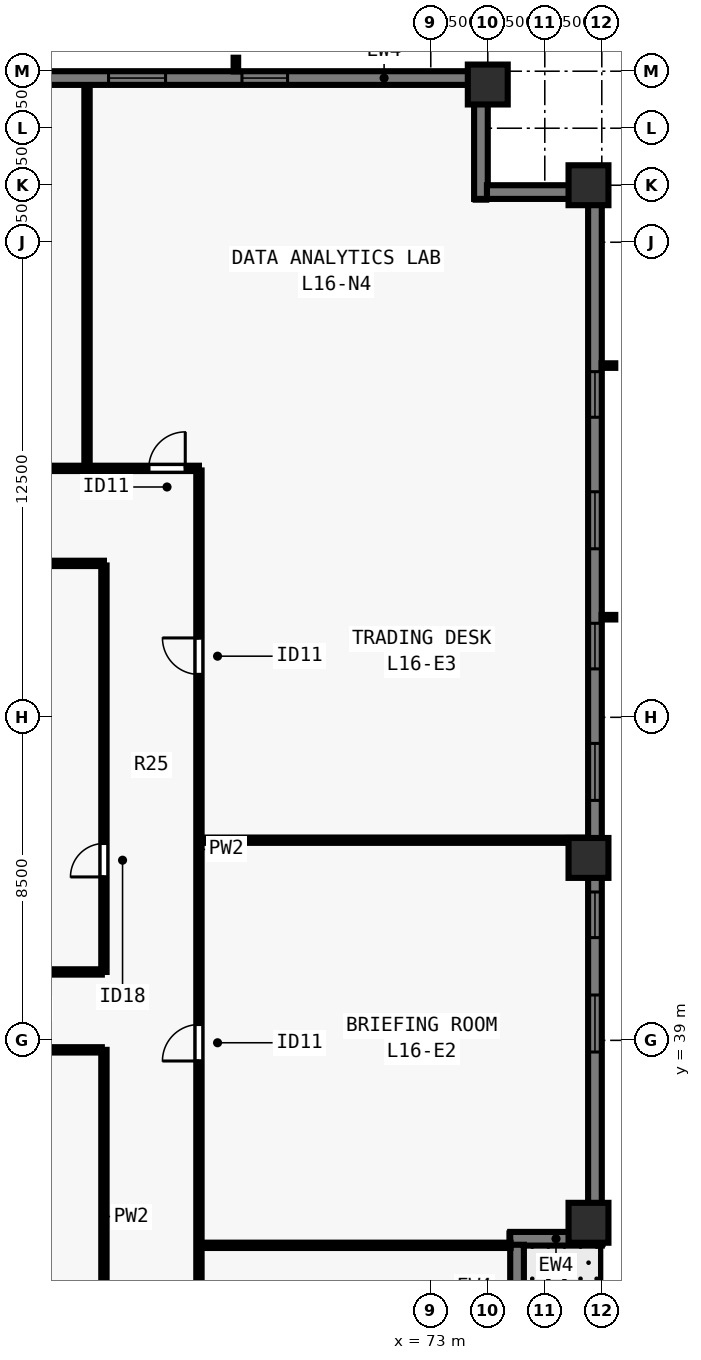
"""IFC4 building model, lengths in metres.
Left out: names, types, materials, properties, quantities, classifications, styles, units other than length and angle.
Written with IfcOpenShell. Run it as: python <this file> out.ifc"""

import sys

from ifc_helpers import new_model, si_unit, direction, frame, frame_2d, origin, origin_2d, place, context, subcontext, project, spatial, rectangle, extrude, element, fill, save


model = new_model("IFC4")
c1 = context("Model", 3, precision=1e-05, world=origin(), true_north=direction((0.0, 1.0)))
c2 = subcontext(c1, "Body", "Model", "MODEL_VIEW")
j1 = project(units=[si_unit("LENGTHUNIT", "METRE"), si_unit("PLANEANGLEUNIT", "RADIAN")], contexts=[c1])
p1 = place(None, origin())
s1 = spatial("IfcSite", under=j1, at=p1, CompositionType="ELEMENT")
p2 = place(p1, origin())
s2 = spatial("IfcBuilding", under=s1, at=p2, CompositionType="ELEMENT")
p3 = place(p2, frame((0.0, 0.0, 62.0)))
s3 = spatial("IfcBuildingStorey", under=s2, at=p3, CompositionType="ELEMENT", Elevation=62.0)
for number, where, z_axis, x_axis in (
    (1, (77.15, 34.2, 0.0), (0.0, 0.0, 1.0), (0.0, 1.0, 0.0)),
    (2, (77.15, 43.8, 0.0), (0.0, 0.0, 1.0), (0.0, 1.0, 0.0)),
    (3, (77.15, 61.5, 0.0), (0.0, 0.0, 1.0), (0.0, 1.0, 0.0)),
    (4, (74.5, 64.15, 0.0), (0.0, 0.0, 1.0), (1.0, 0.0, 0.0)),
):
    element("IfcColumn", number, at=place(p3, frame(where, z_axis=z_axis, x_axis=x_axis)), inside=s3, PredefinedType="COLUMN", context=c2, shape_type="SweptSolid", body=[
        extrude(rectangle(XDim=1.05, YDim=1.05, at=origin_2d()), origin(), (0.0, 0.0, 1.0), 3.5),
    ])
p4 = place(p3, frame((29.5, 64.32, 0.0), z_axis=(0.0, 0.0, 1.0), x_axis=(1.0, 0.0, 0.0)))
e5 = element("IfcWall", 5, at=p4, inside=s3, PredefinedType="SOLIDWALL", context=c2, shape_type="SweptSolid", body=[
    extrude(rectangle(XDim=44.662, YDim=0.36, at=frame_2d((22.331, 0.0))), origin(), (0.0, 0.0, 1.0), 3.28),
])
p5 = place(p4, frame((4.93, 0.0, 0.8)))
e6 = element("IfcOpeningElement", 6, at=p5, cuts=e5, PredefinedType="OPENING", context=c2, shape_type="SweptSolid", body=[
    extrude(rectangle(XDim=1.2, YDim=1.544, at=frame_2d((0.6, 0.772))), frame((0.0, 0.19, 0.0), z_axis=(0.0, -1.0, 0.0), x_axis=(1.0, 0.0, 0.0)), (0.0, 0.0, 1.0), 0.38),
])
p6 = place(p4, frame((7.29, 0.0, 0.8)))
e7 = element("IfcOpeningElement", 7, at=p6, cuts=e5, PredefinedType="OPENING", context=c2, shape_type="SweptSolid", body=[
    extrude(rectangle(XDim=1.5, YDim=1.544, at=frame_2d((0.75, 0.772))), frame((0.0, 0.19, 0.0), z_axis=(0.0, -1.0, 0.0), x_axis=(1.0, 0.0, 0.0)), (0.0, 0.0, 1.0), 0.38),
])
p7 = place(p4, frame((11.65, 0.0, 0.8)))
e8 = element("IfcOpeningElement", 8, at=p7, cuts=e5, PredefinedType="OPENING", context=c2, shape_type="SweptSolid", body=[
    extrude(rectangle(XDim=1.2, YDim=1.544, at=frame_2d((0.6, 0.772))), frame((0.0, 0.19, 0.0), z_axis=(0.0, -1.0, 0.0), x_axis=(1.0, 0.0, 0.0)), (0.0, 0.0, 1.0), 0.38),
])
p8 = place(p4, frame((14.861, 0.0, 0.8)))
e9 = element("IfcOpeningElement", 9, at=p8, cuts=e5, PredefinedType="OPENING", context=c2, shape_type="SweptSolid", body=[
    extrude(rectangle(XDim=1.5, YDim=1.544, at=frame_2d((0.75, 0.772))), frame((0.0, 0.19, 0.0), z_axis=(0.0, -1.0, 0.0), x_axis=(1.0, 0.0, 0.0)), (0.0, 0.0, 1.0), 0.38),
])
p9 = place(p4, frame((18.821, 0.0, 0.8)))
e10 = element("IfcOpeningElement", 10, at=p9, cuts=e5, PredefinedType="OPENING", context=c2, shape_type="SweptSolid", body=[
    extrude(rectangle(XDim=1.2, YDim=1.544, at=frame_2d((0.6, 0.772))), frame((0.0, 0.19, 0.0), z_axis=(0.0, -1.0, 0.0), x_axis=(1.0, 0.0, 0.0)), (0.0, 0.0, 1.0), 0.38),
])
p10 = place(p4, frame((20.731, 0.0, 0.8)))
e11 = element("IfcOpeningElement", 11, at=p10, cuts=e5, PredefinedType="OPENING", context=c2, shape_type="SweptSolid", body=[
    extrude(rectangle(XDim=1.5, YDim=1.544, at=frame_2d((0.75, 0.772))), frame((0.0, 0.19, 0.0), z_axis=(0.0, -1.0, 0.0), x_axis=(1.0, 0.0, 0.0)), (0.0, 0.0, 1.0), 0.38),
])
p11 = place(p4, frame((25.091, 0.0, 0.8)))
e12 = element("IfcOpeningElement", 12, at=p11, cuts=e5, PredefinedType="OPENING", context=c2, shape_type="SweptSolid", body=[
    extrude(rectangle(XDim=1.2, YDim=1.544, at=frame_2d((0.6, 0.772))), frame((0.0, 0.19, 0.0), z_axis=(0.0, -1.0, 0.0), x_axis=(1.0, 0.0, 0.0)), (0.0, 0.0, 1.0), 0.38),
])
p12 = place(p4, frame((28.302, 0.0, 0.8)))
e13 = element("IfcOpeningElement", 13, at=p12, cuts=e5, PredefinedType="OPENING", context=c2, shape_type="SweptSolid", body=[
    extrude(rectangle(XDim=1.5, YDim=1.544, at=frame_2d((0.75, 0.772))), frame((0.0, 0.19, 0.0), z_axis=(0.0, -1.0, 0.0), x_axis=(1.0, 0.0, 0.0)), (0.0, 0.0, 1.0), 0.38),
])
p13 = place(p4, frame((31.812, 0.0, 0.8)))
e14 = element("IfcOpeningElement", 14, at=p13, cuts=e5, PredefinedType="OPENING", context=c2, shape_type="SweptSolid", body=[
    extrude(rectangle(XDim=1.2, YDim=1.544, at=frame_2d((0.6, 0.772))), frame((0.0, 0.19, 0.0), z_axis=(0.0, -1.0, 0.0), x_axis=(1.0, 0.0, 0.0)), (0.0, 0.0, 1.0), 0.38),
])
p14 = place(p4, frame((35.022, 0.0, 0.8)))
e15 = element("IfcOpeningElement", 15, at=p14, cuts=e5, PredefinedType="OPENING", context=c2, shape_type="SweptSolid", body=[
    extrude(rectangle(XDim=1.5, YDim=1.544, at=frame_2d((0.75, 0.772))), frame((0.0, 0.19, 0.0), z_axis=(0.0, -1.0, 0.0), x_axis=(1.0, 0.0, 0.0)), (0.0, 0.0, 1.0), 0.38),
])
p15 = place(p4, frame((38.532, 0.0, 0.8)))
e16 = element("IfcOpeningElement", 16, at=p15, cuts=e5, PredefinedType="OPENING", context=c2, shape_type="SweptSolid", body=[
    extrude(rectangle(XDim=1.2, YDim=1.544, at=frame_2d((0.6, 0.772))), frame((0.0, 0.19, 0.0), z_axis=(0.0, -1.0, 0.0), x_axis=(1.0, 0.0, 0.0)), (0.0, 0.0, 1.0), 0.38),
])
p16 = place(p3, frame((74.32, 64.5, 0.0), z_axis=(0.0, 0.0, 1.0), x_axis=(0.0, -1.0, 0.0)))
e17 = element("IfcWall", 17, at=p16, inside=s3, PredefinedType="SOLIDWALL", context=c2, shape_type="SweptSolid", body=[
    extrude(rectangle(XDim=3.36, YDim=0.36, at=frame_2d((1.68, 0.0))), origin(), (0.0, 0.0, 1.0), 3.28),
])
p17 = place(p3, frame((74.478, 61.32, 0.0), z_axis=(0.0, 0.0, 1.0), x_axis=(1.0, 0.0, 0.0)))
e18 = element("IfcWall", 18, at=p17, inside=s3, PredefinedType="SOLIDWALL", context=c2, shape_type="SweptSolid", body=[
    extrude(rectangle(XDim=2.684, YDim=0.36, at=frame_2d((1.342, 0.0))), origin(), (0.0, 0.0, 1.0), 3.28),
])
p18 = place(p3, frame((77.32, 61.5, 0.0), z_axis=(0.0, 0.0, 1.0), x_axis=(0.0, -1.0, 0.0)))
e19 = element("IfcWall", 19, at=p18, inside=s3, PredefinedType="SOLIDWALL", context=c2, shape_type="SweptSolid", body=[
    extrude(rectangle(XDim=27.562, YDim=0.36, at=frame_2d((13.781, 0.0))), origin(), (0.0, 0.0, 1.0), 3.28),
])
p19 = place(p18, frame((4.905, 0.0, 0.8)))
e20 = element("IfcOpeningElement", 20, at=p19, cuts=e19, PredefinedType="OPENING", context=c2, shape_type="SweptSolid", body=[
    extrude(rectangle(XDim=1.2, YDim=1.544, at=frame_2d((0.6, 0.772))), frame((0.0, 0.19, 0.0), z_axis=(0.0, -1.0, 0.0), x_axis=(1.0, 0.0, 0.0)), (0.0, 0.0, 1.0), 0.38),
])
p20 = place(p18, frame((8.065, 0.0, 0.8)))
e21 = element("IfcOpeningElement", 21, at=p20, cuts=e19, PredefinedType="OPENING", context=c2, shape_type="SweptSolid", body=[
    extrude(rectangle(XDim=1.5, YDim=1.544, at=frame_2d((0.75, 0.772))), frame((0.0, 0.19, 0.0), z_axis=(0.0, -1.0, 0.0), x_axis=(1.0, 0.0, 0.0)), (0.0, 0.0, 1.0), 0.38),
])
p21 = place(p18, frame((11.526, 0.0, 0.8)))
e22 = element("IfcOpeningElement", 22, at=p21, cuts=e19, PredefinedType="OPENING", context=c2, shape_type="SweptSolid", body=[
    extrude(rectangle(XDim=1.2, YDim=1.544, at=frame_2d((0.6, 0.772))), frame((0.0, 0.19, 0.0), z_axis=(0.0, -1.0, 0.0), x_axis=(1.0, 0.0, 0.0)), (0.0, 0.0, 1.0), 0.38),
])
p22 = place(p18, frame((14.686, 0.0, 0.8)))
e23 = element("IfcOpeningElement", 23, at=p22, cuts=e19, PredefinedType="OPENING", context=c2, shape_type="SweptSolid", body=[
    extrude(rectangle(XDim=1.5, YDim=1.544, at=frame_2d((0.75, 0.772))), frame((0.0, 0.19, 0.0), z_axis=(0.0, -1.0, 0.0), x_axis=(1.0, 0.0, 0.0)), (0.0, 0.0, 1.0), 0.38),
])
p23 = place(p18, frame((18.596, 0.0, 0.8)))
e24 = element("IfcOpeningElement", 24, at=p23, cuts=e19, PredefinedType="OPENING", context=c2, shape_type="SweptSolid", body=[
    extrude(rectangle(XDim=1.2, YDim=1.544, at=frame_2d((0.6, 0.772))), frame((0.0, 0.19, 0.0), z_axis=(0.0, -1.0, 0.0), x_axis=(1.0, 0.0, 0.0)), (0.0, 0.0, 1.0), 0.38),
])
p24 = place(p18, frame((21.307, 0.0, 0.8)))
e25 = element("IfcOpeningElement", 25, at=p24, cuts=e19, PredefinedType="OPENING", context=c2, shape_type="SweptSolid", body=[
    extrude(rectangle(XDim=1.5, YDim=1.544, at=frame_2d((0.75, 0.772))), frame((0.0, 0.19, 0.0), z_axis=(0.0, -1.0, 0.0), x_axis=(1.0, 0.0, 0.0)), (0.0, 0.0, 1.0), 0.38),
])
p25 = place(p3, frame((77.5, 33.78, 0.0), z_axis=(0.0, 0.0, 1.0), x_axis=(-1.0, 0.0, 0.0)))
e26 = element("IfcWall", 26, at=p25, inside=s3, PredefinedType="SOLIDWALL", context=c2, shape_type="SweptSolid", body=[
    extrude(rectangle(XDim=2.41, YDim=0.36, at=frame_2d((1.205, 0.0))), origin(), (0.0, 0.0, 1.0), 3.28),
])
p26 = place(p3, frame((75.27, 33.622, 0.0), z_axis=(0.0, 0.0, 1.0), x_axis=(0.0, -1.0, 0.0)))
e27 = element("IfcWall", 27, at=p26, inside=s3, PredefinedType="SOLIDWALL", context=c2, shape_type="SweptSolid", body=[
    extrude(rectangle(XDim=5.782, YDim=0.36, at=frame_2d((2.891, 0.0))), origin(), (0.0, 0.0, 1.0), 3.28),
])
p27 = place(p26, frame((2.391, 0.0, 0.0)))
e28 = element("IfcOpeningElement", 28, at=p27, cuts=e27, PredefinedType="OPENING", context=c2, shape_type="SweptSolid", body=[
    extrude(rectangle(XDim=1.0, YDim=2.15, at=frame_2d((0.5, 1.075))), frame((0.0, 0.19, 0.0), z_axis=(0.0, -1.0, 0.0), x_axis=(1.0, 0.0, 0.0)), (0.0, 0.0, 1.0), 0.38),
])
p28 = place(p3, frame((37.1, 54.05, 0.0), z_axis=(0.0, 0.0, 1.0), x_axis=(1.0, 0.0, 0.0)))
e29 = element("IfcWall", 29, at=p28, inside=s3, PredefinedType="PARTITIONING", context=c2, shape_type="SweptSolid", body=[
    extrude(rectangle(XDim=29.8, YDim=0.14, at=frame_2d((14.9, 0.0))), origin(), (0.0, 0.0, 1.0), 3.28),
])
p29 = place(p28, frame((3.522, 0.0, 0.0)))
e30 = element("IfcOpeningElement", 30, at=p29, cuts=e29, PredefinedType="OPENING", context=c2, shape_type="SweptSolid", body=[
    extrude(rectangle(XDim=0.96, YDim=2.12, at=frame_2d((0.48, 1.06))), frame((0.0, 0.08, 0.0), z_axis=(0.0, -1.0, 0.0), x_axis=(1.0, 0.0, 0.0)), (0.0, 0.0, 1.0), 0.16),
])
p30 = place(p28, frame((8.06, 0.0, 0.0)))
e31 = element("IfcOpeningElement", 31, at=p30, cuts=e29, PredefinedType="OPENING", context=c2, shape_type="SweptSolid", body=[
    extrude(rectangle(XDim=0.96, YDim=2.12, at=frame_2d((0.48, 1.06))), frame((0.0, 0.08, 0.0), z_axis=(0.0, -1.0, 0.0), x_axis=(1.0, 0.0, 0.0)), (0.0, 0.0, 1.0), 0.16),
])
p31 = place(p28, frame((20.6, 0.0, 0.0)))
e32 = element("IfcOpeningElement", 32, at=p31, cuts=e29, PredefinedType="OPENING", context=c2, shape_type="SweptSolid", body=[
    extrude(rectangle(XDim=0.96, YDim=2.12, at=frame_2d((0.48, 1.06))), frame((0.0, 0.08, 0.0), z_axis=(0.0, -1.0, 0.0), x_axis=(1.0, 0.0, 0.0)), (0.0, 0.0, 1.0), 0.16),
])
p32 = place(p28, frame((28.48, 0.0, 0.0)))
e33 = element("IfcOpeningElement", 33, at=p32, cuts=e29, PredefinedType="OPENING", context=c2, shape_type="SweptSolid", body=[
    extrude(rectangle(XDim=0.96, YDim=2.12, at=frame_2d((0.48, 1.06))), frame((0.0, 0.08, 0.0), z_axis=(0.0, -1.0, 0.0), x_axis=(1.0, 0.0, 0.0)), (0.0, 0.0, 1.0), 0.16),
])
p33 = place(p3, frame((66.9, 24.005, 0.0), z_axis=(0.0, 0.0, 1.0), x_axis=(0.0, 1.0, 0.0)))
e34 = element("IfcWall", 34, at=p33, inside=s3, PredefinedType="PARTITIONING", context=c2, shape_type="SweptSolid", body=[
    extrude(rectangle(XDim=29.99, YDim=0.14, at=frame_2d((14.995, 0.0))), origin(), (0.0, 0.0, 1.0), 3.28),
])
p34 = place(p33, frame((4.344, 0.0, 0.0)))
e35 = element("IfcOpeningElement", 35, at=p34, cuts=e34, PredefinedType="OPENING", context=c2, shape_type="SweptSolid", body=[
    extrude(rectangle(XDim=0.96, YDim=2.12, at=frame_2d((0.48, 1.06))), frame((0.0, 0.08, 0.0), z_axis=(0.0, -1.0, 0.0), x_axis=(1.0, 0.0, 0.0)), (0.0, 0.0, 1.0), 0.16),
])
p35 = place(p33, frame((14.452, 0.0, 0.0)))
e36 = element("IfcOpeningElement", 36, at=p35, cuts=e34, PredefinedType="OPENING", context=c2, shape_type="SweptSolid", body=[
    extrude(rectangle(XDim=0.96, YDim=2.12, at=frame_2d((0.48, 1.06))), frame((0.0, 0.08, 0.0), z_axis=(0.0, -1.0, 0.0), x_axis=(1.0, 0.0, 0.0)), (0.0, 0.0, 1.0), 0.16),
])
p36 = place(p33, frame((24.623, 0.0, 0.0)))
e37 = element("IfcOpeningElement", 37, at=p36, cuts=e34, PredefinedType="OPENING", context=c2, shape_type="SweptSolid", body=[
    extrude(rectangle(XDim=0.96, YDim=2.12, at=frame_2d((0.48, 1.06))), frame((0.0, 0.08, 0.0), z_axis=(0.0, -1.0, 0.0), x_axis=(1.0, 0.0, 0.0)), (0.0, 0.0, 1.0), 0.16),
])
p37 = place(p3, frame((39.6, 51.55, 0.0), z_axis=(0.0, 0.0, 1.0), x_axis=(1.0, 0.0, 0.0)))
e38 = element("IfcWall", 38, at=p37, inside=s3, PredefinedType="PARTITIONING", context=c2, shape_type="SweptSolid", body=[
    extrude(rectangle(XDim=24.8, YDim=0.14, at=frame_2d((12.4, 0.0))), origin(), (0.0, 0.0, 1.0), 3.28),
])
p38 = place(p37, frame((3.2, 0.0, 0.0)))
e39 = element("IfcOpeningElement", 39, at=p38, cuts=e38, PredefinedType="OPENING", context=c2, shape_type="SweptSolid", body=[
    extrude(rectangle(XDim=0.96, YDim=2.12, at=frame_2d((0.48, 1.06))), frame((0.0, 0.08, 0.0), z_axis=(0.0, -1.0, 0.0), x_axis=(1.0, 0.0, 0.0)), (0.0, 0.0, 1.0), 0.16),
])
p39 = place(p37, frame((18.4, 0.0, 0.0)))
e40 = element("IfcOpeningElement", 40, at=p39, cuts=e38, PredefinedType="OPENING", context=c2, shape_type="SweptSolid", body=[
    extrude(rectangle(XDim=0.96, YDim=2.12, at=frame_2d((0.48, 1.06))), frame((0.0, 0.08, 0.0), z_axis=(0.0, -1.0, 0.0), x_axis=(1.0, 0.0, 0.0)), (0.0, 0.0, 1.0), 0.16),
])
p40 = place(p3, frame((64.4, 26.505, 0.0), z_axis=(0.0, 0.0, 1.0), x_axis=(0.0, 1.0, 0.0)))
e41 = element("IfcWall", 41, at=p40, inside=s3, PredefinedType="PARTITIONING", context=c2, shape_type="SweptSolid", body=[
    extrude(rectangle(XDim=12.245, YDim=0.14, at=frame_2d((6.123, 0.0))), origin(), (0.0, 0.0, 1.0), 3.28),
])
p41 = place(p40, frame((2.445, 0.0, 0.0)))
e42 = element("IfcOpeningElement", 42, at=p41, cuts=e41, PredefinedType="OPENING", context=c2, shape_type="SweptSolid", body=[
    extrude(rectangle(XDim=0.88, YDim=2.1, at=frame_2d((0.44, 1.05))), frame((0.0, 0.08, 0.0), z_axis=(0.0, -1.0, 0.0), x_axis=(1.0, 0.0, 0.0)), (0.0, 0.0, 1.0), 0.16),
])
p42 = place(p3, frame((64.4, 40.8, 0.0), z_axis=(0.0, 0.0, 1.0), x_axis=(0.0, 1.0, 0.0)))
e43 = element("IfcWall", 43, at=p42, inside=s3, PredefinedType="PARTITIONING", context=c2, shape_type="SweptSolid", body=[
    extrude(rectangle(XDim=10.695, YDim=0.14, at=frame_2d((5.348, 0.0))), origin(), (0.0, 0.0, 1.0), 3.28),
])
p43 = place(p42, frame((2.5, 0.0, 0.0)))
e44 = element("IfcOpeningElement", 44, at=p43, cuts=e43, PredefinedType="OPENING", context=c2, shape_type="SweptSolid", body=[
    extrude(rectangle(XDim=0.88, YDim=2.1, at=frame_2d((0.44, 1.05))), frame((0.0, 0.08, 0.0), z_axis=(0.0, -1.0, 0.0), x_axis=(1.0, 0.0, 0.0)), (0.0, 0.0, 1.0), 0.16),
])
for number, where, z_axis, x_axis in (
    (45, (60.76, 38.75, 0.0), (0.0, 0.0, 1.0), (1.0, 0.0, 0.0)),
    (46, (60.76, 40.8, 0.0), (0.0, 0.0, 1.0), (1.0, 0.0, 0.0)),
):
    element("IfcWall", number, at=place(p3, frame(where, z_axis=z_axis, x_axis=x_axis)), inside=s3, PredefinedType="PARTITIONING", context=c2, shape_type="SweptSolid", body=[
        extrude(rectangle(XDim=3.585, YDim=0.14, at=frame_2d((1.792, 0.0))), origin(), (0.0, 0.0, 1.0), 3.28),
    ])
p44 = place(p3, frame((63.955, 54.15, 0.0), z_axis=(0.0, 0.0, 1.0), x_axis=(0.0, 1.0, 0.0)))
e47 = element("IfcWall", 47, at=p44, inside=s3, PredefinedType="PARTITIONING", context=c2, shape_type="SweptSolid", body=[
    extrude(rectangle(XDim=9.93, YDim=0.14, at=frame_2d((4.965, 0.0))), origin(), (0.0, 0.0, 1.0), 3.28),
])
p45 = place(p3, frame((67.0, 33.607, 0.0), z_axis=(0.0, 0.0, 1.0), x_axis=(1.0, 0.0, 0.0)))
e48 = element("IfcWall", 48, at=p45, inside=s3, PredefinedType="PARTITIONING", context=c2, shape_type="SweptSolid", body=[
    extrude(rectangle(XDim=8.1, YDim=0.14, at=frame_2d((4.05, 0.0))), origin(), (0.0, 0.0, 1.0), 2.439),
])
p46 = place(p3, frame((67.0, 44.267, 0.0), z_axis=(0.0, 0.0, 1.0), x_axis=(1.0, 0.0, 0.0)))
e49 = element("IfcWall", 49, at=p46, inside=s3, PredefinedType="PARTITIONING", context=c2, shape_type="SweptSolid", body=[
    extrude(rectangle(XDim=10.08, YDim=0.14, at=frame_2d((5.04, 0.0))), origin(), (0.0, 0.0, 1.0), 2.439),
])
p47 = place(p14, origin())
e50 = element("IfcWindow", 50, at=p47, inside=s3, PartitioningType="SINGLE_PANEL", PredefinedType="WINDOW", context=c2, shape_type="SweptSolid", body=[
    extrude(rectangle(XDim=1.5, YDim=1.544, at=frame_2d((0.75, 0.772))), frame((0.0, -0.05, 0.0), z_axis=(0.0, -1.0, 0.0), x_axis=(1.0, 0.0, 0.0)), (0.0, 0.0, 1.0), 0.06),
])
fill(e15, e50)
p48 = place(p15, origin())
e51 = element("IfcWindow", 51, at=p48, inside=s3, PartitioningType="SINGLE_PANEL", PredefinedType="WINDOW", context=c2, shape_type="SweptSolid", body=[
    extrude(rectangle(XDim=1.2, YDim=1.544, at=frame_2d((0.6, 0.772))), frame((0.0, -0.05, 0.0), z_axis=(0.0, -1.0, 0.0), x_axis=(1.0, 0.0, 0.0)), (0.0, 0.0, 1.0), 0.06),
])
fill(e16, e51)
p49 = place(p19, origin())
e52 = element("IfcWindow", 52, at=p49, inside=s3, PartitioningType="SINGLE_PANEL", PredefinedType="WINDOW", context=c2, shape_type="SweptSolid", body=[
    extrude(rectangle(XDim=1.2, YDim=1.544, at=frame_2d((0.6, 0.772))), frame((0.0, -0.05, 0.0), z_axis=(0.0, -1.0, 0.0), x_axis=(1.0, 0.0, 0.0)), (0.0, 0.0, 1.0), 0.06),
])
fill(e20, e52)
p50 = place(p20, origin())
e53 = element("IfcWindow", 53, at=p50, inside=s3, PartitioningType="SINGLE_PANEL", PredefinedType="WINDOW", context=c2, shape_type="SweptSolid", body=[
    extrude(rectangle(XDim=1.5, YDim=1.544, at=frame_2d((0.75, 0.772))), frame((0.0, -0.05, 0.0), z_axis=(0.0, -1.0, 0.0), x_axis=(1.0, 0.0, 0.0)), (0.0, 0.0, 1.0), 0.06),
])
fill(e21, e53)
p51 = place(p21, origin())
e54 = element("IfcWindow", 54, at=p51, inside=s3, PartitioningType="SINGLE_PANEL", PredefinedType="WINDOW", context=c2, shape_type="SweptSolid", body=[
    extrude(rectangle(XDim=1.2, YDim=1.544, at=frame_2d((0.6, 0.772))), frame((0.0, -0.05, 0.0), z_axis=(0.0, -1.0, 0.0), x_axis=(1.0, 0.0, 0.0)), (0.0, 0.0, 1.0), 0.06),
])
fill(e22, e54)
p52 = place(p22, origin())
e55 = element("IfcWindow", 55, at=p52, inside=s3, PartitioningType="SINGLE_PANEL", PredefinedType="WINDOW", context=c2, shape_type="SweptSolid", body=[
    extrude(rectangle(XDim=1.5, YDim=1.544, at=frame_2d((0.75, 0.772))), frame((0.0, -0.05, 0.0), z_axis=(0.0, -1.0, 0.0), x_axis=(1.0, 0.0, 0.0)), (0.0, 0.0, 1.0), 0.06),
])
fill(e23, e55)
p53 = place(p23, origin())
e56 = element("IfcWindow", 56, at=p53, inside=s3, PartitioningType="SINGLE_PANEL", PredefinedType="WINDOW", context=c2, shape_type="SweptSolid", body=[
    extrude(rectangle(XDim=1.2, YDim=1.544, at=frame_2d((0.6, 0.772))), frame((0.0, -0.05, 0.0), z_axis=(0.0, -1.0, 0.0), x_axis=(1.0, 0.0, 0.0)), (0.0, 0.0, 1.0), 0.06),
])
fill(e24, e56)
p54 = place(p24, origin())
e57 = element("IfcWindow", 57, at=p54, inside=s3, PartitioningType="SINGLE_PANEL", PredefinedType="WINDOW", context=c2, shape_type="SweptSolid", body=[
    extrude(rectangle(XDim=1.5, YDim=1.544, at=frame_2d((0.75, 0.772))), frame((0.0, -0.05, 0.0), z_axis=(0.0, -1.0, 0.0), x_axis=(1.0, 0.0, 0.0)), (0.0, 0.0, 1.0), 0.06),
])
fill(e25, e57)
p55 = place(p43, origin())
e58 = element("IfcDoor", 58, at=p55, inside=s3, OperationType="SINGLE_SWING_LEFT", PredefinedType="DOOR", context=c2, shape_type="SweptSolid", body=[
    extrude(rectangle(XDim=0.88, YDim=2.1, at=frame_2d((0.44, 1.05))), frame((0.0, 0.025, 0.0), z_axis=(0.0, -1.0, 0.0), x_axis=(1.0, 0.0, 0.0)), (0.0, 0.0, 1.0), 0.05),
])
fill(e44, e58)
p56 = place(p32, origin())
e59 = element("IfcDoor", 59, at=p56, inside=s3, OperationType="SINGLE_SWING_RIGHT", PredefinedType="DOOR", context=c2, shape_type="SweptSolid", body=[
    extrude(rectangle(XDim=0.96, YDim=2.12, at=frame_2d((0.48, 1.06))), frame((0.0, 0.025, 0.0), z_axis=(0.0, -1.0, 0.0), x_axis=(1.0, 0.0, 0.0)), (0.0, 0.0, 1.0), 0.05),
])
fill(e33, e59)
p57 = place(p35, origin())
e60 = element("IfcDoor", 60, at=p57, inside=s3, OperationType="SINGLE_SWING_LEFT", PredefinedType="DOOR", context=c2, shape_type="SweptSolid", body=[
    extrude(rectangle(XDim=0.96, YDim=2.12, at=frame_2d((0.48, 1.06))), frame((0.0, 0.025, 0.0), z_axis=(0.0, -1.0, 0.0), x_axis=(1.0, 0.0, 0.0)), (0.0, 0.0, 1.0), 0.05),
])
fill(e36, e60)
p58 = place(p36, origin())
e61 = element("IfcDoor", 61, at=p58, inside=s3, OperationType="SINGLE_SWING_RIGHT", PredefinedType="DOOR", context=c2, shape_type="SweptSolid", body=[
    extrude(rectangle(XDim=0.96, YDim=2.12, at=frame_2d((0.48, 1.06))), frame((0.0, 0.025, 0.0), z_axis=(0.0, -1.0, 0.0), x_axis=(1.0, 0.0, 0.0)), (0.0, 0.0, 1.0), 0.05),
])
fill(e37, e61)
save(model, sys.argv[1])
